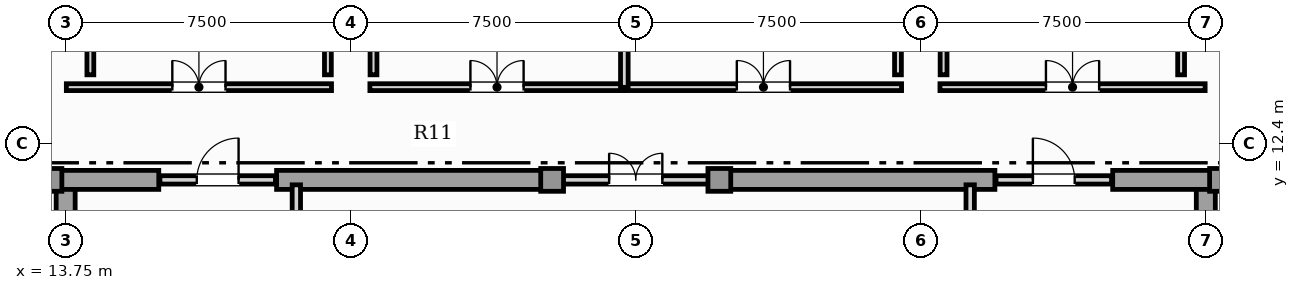
"""IFC4 building model, lengths in metres.
Left out: names, types, materials, properties, quantities, classifications, styles, units other than length and angle.
Written with IfcOpenShell. Run it as: python <this file> out.ifc"""

import sys

from ifc_helpers import new_model, si_unit, direction, frame, frame_2d, origin, origin_2d, place, context, subcontext, project, spatial, rectangle, hollow_rectangle, extrude, element, fill, save


model = new_model("IFC4")
c1 = context("Model", 3, precision=1e-05, world=origin(), true_north=direction((0.0, 1.0)))
c2 = subcontext(c1, "Body", "Model", "MODEL_VIEW")
j1 = project(units=[si_unit("LENGTHUNIT", "METRE"), si_unit("PLANEANGLEUNIT", "RADIAN")], contexts=[c1])
p1 = place(None, origin())
s1 = spatial("IfcSite", under=j1, at=p1, CompositionType="ELEMENT")
p2 = place(p1, origin())
s2 = spatial("IfcBuilding", under=s1, at=p2, CompositionType="ELEMENT")
p3 = place(p2, frame((0.0, 0.0, 377.45)))
s3 = spatial("IfcBuildingStorey", under=s2, at=p3, CompositionType="ELEMENT", Elevation=377.45)
for number, where, z_axis, x_axis in (
    (1, (13.75, 0.92, 0.0), (0.0, 0.0, 1.0), (0.0, 1.0, 0.0)),
    (2, (43.75, 0.92, 0.0), (0.0, 0.0, 1.0), (0.0, 1.0, 0.0)),
):
    element("IfcWall", number, at=place(p3, frame(where, z_axis=z_axis, x_axis=x_axis)), inside=s3, PredefinedType="SHEAR", context=c2, shape_type="SweptSolid", body=[
        extrude(rectangle(XDim=10.53, YDim=0.5, at=frame_2d((5.265, 0.0))), origin(), (0.0, 0.0, 1.0), 5.1),
    ])
p4 = place(p3, frame((13.25, 11.45, 0.0), z_axis=(0.0, 0.0, 1.0), x_axis=(1.0, 0.0, 0.0)))
e3 = element("IfcWall", 3, at=p4, inside=s3, PredefinedType="SHEAR", context=c2, shape_type="SweptSolid", body=[
    extrude(rectangle(XDim=2.95, YDim=0.5, at=frame_2d((1.475, 0.0))), origin(), (0.0, 0.0, 1.0), 5.1),
])
for number, where, z_axis, x_axis in (
    (4, (19.3, 11.45, 0.0), (0.0, 0.0, 1.0), (1.0, 0.0, 0.0)),
    (5, (30.9, 11.45, 0.0), (0.0, 0.0, 1.0), (1.0, 0.0, 0.0)),
):
    element("IfcWall", number, at=place(p3, frame(where, z_axis=z_axis, x_axis=x_axis)), inside=s3, PredefinedType="SHEAR", context=c2, shape_type="SweptSolid", body=[
        extrude(rectangle(XDim=7.3, YDim=0.5, at=frame_2d((3.65, 0.0))), origin(), (0.0, 0.0, 1.0), 5.1),
    ])
p5 = place(p3, frame((41.3, 11.45, 0.0), z_axis=(0.0, 0.0, 1.0), x_axis=(1.0, 0.0, 0.0)))
e6 = element("IfcWall", 6, at=p5, inside=s3, PredefinedType="SHEAR", context=c2, shape_type="SweptSolid", body=[
    extrude(rectangle(XDim=2.95, YDim=0.5, at=frame_2d((1.475, 0.0))), origin(), (0.0, 0.0, 1.0), 5.1),
])
for number, where, z_axis, x_axis in (
    (7, (13.35, 11.45, 0.0), (0.0, 0.0, 1.0), (1.0, 0.0, 0.0)),
    (8, (44.15, 11.45, 0.0), (0.0, 0.0, 1.0), (1.0, 0.0, 0.0)),
    (9, (26.55, 11.45, 0.0), (0.0, 0.0, 1.0), (1.0, 0.0, 0.0)),
    (10, (30.95, 11.45, 0.0), (0.0, 0.0, 1.0), (1.0, 0.0, 0.0)),
):
    element("IfcColumn", number, at=place(p3, frame(where, z_axis=z_axis, x_axis=x_axis)), inside=s3, PredefinedType="USERDEFINED", context=c2, shape_type="SweptSolid", body=[
        extrude(hollow_rectangle(XDim=0.6, YDim=0.6, WallThickness=0.04, at=origin_2d()), origin(), (0.0, 0.0, 1.0), 5.4),
    ])
p6 = place(p3, frame((19.82, 8.52, 0.0), z_axis=(0.0, 0.0, 1.0), x_axis=(0.0, 1.0, 0.0)))
e11 = element("IfcWall", 11, at=p6, inside=s3, PredefinedType="SOLIDWALL", context=c2, shape_type="SweptSolid", body=[
    extrude(rectangle(XDim=2.8, YDim=0.22, at=frame_2d((1.4, 0.0))), origin(), (0.0, 0.0, 1.0), 4.556),
])
p7 = place(p6, frame((0.85, 0.0, 0.0)))
e12 = element("IfcOpeningElement", 12, at=p7, cuts=e11, PredefinedType="OPENING", context=c2, shape_type="SweptSolid", body=[
    extrude(rectangle(XDim=1.1, YDim=2.2, at=frame_2d((0.55, 1.1))), frame((0.0, 0.12, 0.0), z_axis=(0.0, -1.0, 0.0), x_axis=(1.0, 0.0, 0.0)), (0.0, 0.0, 1.0), 0.24),
])
p8 = place(p3, frame((37.55, 8.52, 0.0), z_axis=(0.0, 0.0, 1.0), x_axis=(0.0, 1.0, 0.0)))
e13 = element("IfcWall", 13, at=p8, inside=s3, PredefinedType="SOLIDWALL", context=c2, shape_type="SweptSolid", body=[
    extrude(rectangle(XDim=2.8, YDim=0.22, at=frame_2d((1.4, 0.0))), origin(), (0.0, 0.0, 1.0), 4.556),
])
p9 = place(p8, frame((0.85, 0.0, 0.0)))
e14 = element("IfcOpeningElement", 14, at=p9, cuts=e13, PredefinedType="OPENING", context=c2, shape_type="SweptSolid", body=[
    extrude(rectangle(XDim=1.1, YDim=2.2, at=frame_2d((0.55, 1.1))), frame((0.0, 0.12, 0.0), z_axis=(0.0, -1.0, 0.0), x_axis=(1.0, 0.0, 0.0)), (0.0, 0.0, 1.0), 0.24),
])
p10 = place(p3, frame((16.23, 11.45, 0.0), z_axis=(0.0, 0.0, 1.0), x_axis=(1.0, 0.0, 0.0)))
e15 = element("IfcWall", 15, at=p10, inside=s3, PredefinedType="SOLIDWALL", context=c2, shape_type="SweptSolid", body=[
    extrude(rectangle(XDim=3.04, YDim=0.22, at=frame_2d((1.52, 0.0))), origin(), (0.0, 0.0, 1.0), 5.1),
])
p11 = place(p10, frame((0.97, 0.0, 0.0)))
e16 = element("IfcOpeningElement", 16, at=p11, cuts=e15, PredefinedType="OPENING", context=c2, shape_type="SweptSolid", body=[
    extrude(rectangle(XDim=1.1, YDim=2.2, at=frame_2d((0.55, 1.1))), frame((0.0, 0.12, 0.0), z_axis=(0.0, -1.0, 0.0), x_axis=(1.0, 0.0, 0.0)), (0.0, 0.0, 1.0), 0.24),
])
p12 = place(p3, frame((26.63, 11.45, 0.0), z_axis=(0.0, 0.0, 1.0), x_axis=(1.0, 0.0, 0.0)))
e17 = element("IfcWall", 17, at=p12, inside=s3, PredefinedType="SOLIDWALL", context=c2, shape_type="SweptSolid", body=[
    extrude(rectangle(XDim=4.24, YDim=0.22, at=frame_2d((2.12, 0.0))), origin(), (0.0, 0.0, 1.0), 5.1),
])
p13 = place(p12, frame((1.42, 0.0, 0.0)))
e18 = element("IfcOpeningElement", 18, at=p13, cuts=e17, PredefinedType="OPENING", context=c2, shape_type="SweptSolid", body=[
    extrude(rectangle(XDim=1.4, YDim=2.2, at=frame_2d((0.7, 1.1))), frame((0.0, 0.12, 0.0), z_axis=(0.0, -1.0, 0.0), x_axis=(1.0, 0.0, 0.0)), (0.0, 0.0, 1.0), 0.24),
])
p14 = place(p3, frame((38.23, 11.45, 0.0), z_axis=(0.0, 0.0, 1.0), x_axis=(1.0, 0.0, 0.0)))
e19 = element("IfcWall", 19, at=p14, inside=s3, PredefinedType="SOLIDWALL", context=c2, shape_type="SweptSolid", body=[
    extrude(rectangle(XDim=3.04, YDim=0.22, at=frame_2d((1.52, 0.0))), origin(), (0.0, 0.0, 1.0), 5.1),
])
p15 = place(p14, frame((0.97, 0.0, 0.0)))
e20 = element("IfcOpeningElement", 20, at=p15, cuts=e19, PredefinedType="OPENING", context=c2, shape_type="SweptSolid", body=[
    extrude(rectangle(XDim=1.1, YDim=2.2, at=frame_2d((0.55, 1.1))), frame((0.0, 0.12, 0.0), z_axis=(0.0, -1.0, 0.0), x_axis=(1.0, 0.0, 0.0)), (0.0, 0.0, 1.0), 0.24),
])
p16 = place(p3, frame((13.768, 13.89, 0.0), z_axis=(0.0, 0.0, 1.0), x_axis=(1.0, 0.0, 0.0)))
e21 = element("IfcWall", 21, at=p16, inside=s3, PredefinedType="PARTITIONING", context=c2, shape_type="SweptSolid", body=[
    extrude(rectangle(XDim=6.977, YDim=0.18, at=frame_2d((3.489, 0.0))), origin(), (0.0, 0.0, 1.0), 5.1),
])
p17 = place(p16, frame((2.789, 0.0, 0.0)))
e22 = element("IfcOpeningElement", 22, at=p17, cuts=e21, PredefinedType="OPENING", context=c2, shape_type="SweptSolid", body=[
    extrude(rectangle(XDim=1.4, YDim=2.2, at=frame_2d((0.7, 1.1))), frame((0.0, 0.1, 0.0), z_axis=(0.0, -1.0, 0.0), x_axis=(1.0, 0.0, 0.0)), (0.0, 0.0, 1.0), 0.2),
])
p18 = place(p3, frame((21.755, 13.89, 0.0), z_axis=(0.0, 0.0, 1.0), x_axis=(1.0, 0.0, 0.0)))
e23 = element("IfcWall", 23, at=p18, inside=s3, PredefinedType="PARTITIONING", context=c2, shape_type="SweptSolid", body=[
    extrude(rectangle(XDim=6.69, YDim=0.18, at=frame_2d((3.345, 0.0))), origin(), (0.0, 0.0, 1.0), 5.1),
])
p19 = place(p18, frame((2.645, 0.0, 0.0)))
e24 = element("IfcOpeningElement", 24, at=p19, cuts=e23, PredefinedType="OPENING", context=c2, shape_type="SweptSolid", body=[
    extrude(rectangle(XDim=1.4, YDim=2.2, at=frame_2d((0.7, 1.1))), frame((0.0, 0.1, 0.0), z_axis=(0.0, -1.0, 0.0), x_axis=(1.0, 0.0, 0.0)), (0.0, 0.0, 1.0), 0.2),
])
p20 = place(p3, frame((28.475, 13.89, 0.0), z_axis=(0.0, 0.0, 1.0), x_axis=(1.0, 0.0, 0.0)))
e25 = element("IfcWall", 25, at=p20, inside=s3, PredefinedType="PARTITIONING", context=c2, shape_type="SweptSolid", body=[
    extrude(rectangle(XDim=7.27, YDim=0.18, at=frame_2d((3.635, 0.0))), origin(), (0.0, 0.0, 1.0), 5.1),
])
p21 = place(p20, frame((2.935, 0.0, 0.0)))
e26 = element("IfcOpeningElement", 26, at=p21, cuts=e25, PredefinedType="OPENING", context=c2, shape_type="SweptSolid", body=[
    extrude(rectangle(XDim=1.4, YDim=2.2, at=frame_2d((0.7, 1.1))), frame((0.0, 0.1, 0.0), z_axis=(0.0, -1.0, 0.0), x_axis=(1.0, 0.0, 0.0)), (0.0, 0.0, 1.0), 0.2),
])
p22 = place(p3, frame((36.755, 13.89, 0.0), z_axis=(0.0, 0.0, 1.0), x_axis=(1.0, 0.0, 0.0)))
e27 = element("IfcWall", 27, at=p22, inside=s3, PredefinedType="PARTITIONING", context=c2, shape_type="SweptSolid", body=[
    extrude(rectangle(XDim=6.977, YDim=0.18, at=frame_2d((3.489, 0.0))), origin(), (0.0, 0.0, 1.0), 5.1),
])
p23 = place(p22, frame((2.789, 0.0, 0.0)))
e28 = element("IfcOpeningElement", 28, at=p23, cuts=e27, PredefinedType="OPENING", context=c2, shape_type="SweptSolid", body=[
    extrude(rectangle(XDim=1.4, YDim=2.2, at=frame_2d((0.7, 1.1))), frame((0.0, 0.1, 0.0), z_axis=(0.0, -1.0, 0.0), x_axis=(1.0, 0.0, 0.0)), (0.0, 0.0, 1.0), 0.2),
])
p24 = place(p3, frame((28.45, 13.885, 0.0), z_axis=(0.0, 0.0, 1.0), x_axis=(0.0, 1.0, 0.0)))
e29 = element("IfcWall", 29, at=p24, inside=s3, PredefinedType="PARTITIONING", context=c2, shape_type="SweptSolid", body=[
    extrude(rectangle(XDim=8.097, YDim=0.2, at=frame_2d((4.048, 0.0))), origin(), (0.0, 0.0, 1.0), 5.1),
])
p25 = place(p3, frame((20.65, 14.215, 0.0), z_axis=(0.0, 0.0, 1.0), x_axis=(0.0, 1.0, 0.0)))
e30 = element("IfcWall", 30, at=p25, inside=s3, PredefinedType="PARTITIONING", context=c2, shape_type="SweptSolid", body=[
    extrude(rectangle(XDim=7.767, YDim=0.18, at=frame_2d((3.883, 0.0))), origin(), (0.0, 0.0, 1.0), 5.1),
])
p26 = place(p3, frame((14.4, 21.991, 0.0), z_axis=(0.0, 0.0, 1.0), x_axis=(0.0, -1.0, 0.0)))
e31 = element("IfcWall", 31, at=p26, inside=s3, PredefinedType="PARTITIONING", context=c2, shape_type="SweptSolid", body=[
    extrude(rectangle(XDim=7.776, YDim=0.18, at=frame_2d((3.888, 0.0))), origin(), (0.0, 0.0, 1.0), 5.1),
])
for number, where, z_axis, x_axis in (
    (32, (21.85, 21.982, 0.0), (0.0, 0.0, 1.0), (0.0, -1.0, 0.0)),
    (33, (35.65, 14.215, 0.0), (0.0, 0.0, 1.0), (0.0, 1.0, 0.0)),
):
    element("IfcWall", number, at=place(p3, frame(where, z_axis=z_axis, x_axis=x_axis)), inside=s3, PredefinedType="PARTITIONING", context=c2, shape_type="SweptSolid", body=[
        extrude(rectangle(XDim=7.767, YDim=0.18, at=frame_2d((3.883, 0.0))), origin(), (0.0, 0.0, 1.0), 5.1),
    ])
for number, where, z_axis, x_axis in (
    (34, (43.1, 14.215, 0.0), (0.0, 0.0, 1.0), (0.0, 1.0, 0.0)),
    (35, (36.85, 18.295, 0.0), (0.0, 0.0, 1.0), (0.0, -1.0, 0.0)),
):
    element("IfcWall", number, at=place(p3, frame(where, z_axis=z_axis, x_axis=x_axis)), inside=s3, PredefinedType="PARTITIONING", context=c2, shape_type="SweptSolid", body=[
        extrude(rectangle(XDim=4.08, YDim=0.18, at=frame_2d((2.04, 0.0))), origin(), (0.0, 0.0, 1.0), 5.1),
    ])
p27 = place(p11, origin())
e36 = element("IfcDoor", 36, at=p27, inside=s3, OperationType="SINGLE_SWING_RIGHT", PredefinedType="DOOR", context=c2, shape_type="SweptSolid", body=[
    extrude(rectangle(XDim=1.1, YDim=2.2, at=frame_2d((0.55, 1.1))), frame((0.0, 0.025, 0.0), z_axis=(0.0, -1.0, 0.0), x_axis=(1.0, 0.0, 0.0)), (0.0, 0.0, 1.0), 0.05),
])
fill(e16, e36)
p28 = place(p13, origin())
e37 = element("IfcDoor", 37, at=p28, inside=s3, OperationType="DOUBLE_DOOR_SINGLE_SWING", PredefinedType="DOOR", context=c2, shape_type="SweptSolid", body=[
    extrude(rectangle(XDim=1.4, YDim=2.2, at=frame_2d((0.7, 1.1))), frame((0.0, 0.025, 0.0), z_axis=(0.0, -1.0, 0.0), x_axis=(1.0, 0.0, 0.0)), (0.0, 0.0, 1.0), 0.05),
])
fill(e18, e37)
p29 = place(p15, origin())
e38 = element("IfcDoor", 38, at=p29, inside=s3, OperationType="SINGLE_SWING_LEFT", PredefinedType="DOOR", context=c2, shape_type="SweptSolid", body=[
    extrude(rectangle(XDim=1.1, YDim=2.2, at=frame_2d((0.55, 1.1))), frame((0.0, 0.025, 0.0), z_axis=(0.0, -1.0, 0.0), x_axis=(1.0, 0.0, 0.0)), (0.0, 0.0, 1.0), 0.05),
])
fill(e20, e38)
p30 = place(p17, origin())
e39 = element("IfcDoor", 39, at=p30, inside=s3, OperationType="DOUBLE_DOOR_SINGLE_SWING", PredefinedType="DOOR", context=c2, shape_type="SweptSolid", body=[
    extrude(rectangle(XDim=1.4, YDim=2.2, at=frame_2d((0.7, 1.1))), frame((0.0, 0.025, 0.0), z_axis=(0.0, -1.0, 0.0), x_axis=(1.0, 0.0, 0.0)), (0.0, 0.0, 1.0), 0.05),
])
fill(e22, e39)
p31 = place(p19, origin())
e40 = element("IfcDoor", 40, at=p31, inside=s3, OperationType="DOUBLE_DOOR_SINGLE_SWING", PredefinedType="DOOR", context=c2, shape_type="SweptSolid", body=[
    extrude(rectangle(XDim=1.4, YDim=2.2, at=frame_2d((0.7, 1.1))), frame((0.0, 0.025, 0.0), z_axis=(0.0, -1.0, 0.0), x_axis=(1.0, 0.0, 0.0)), (0.0, 0.0, 1.0), 0.05),
])
fill(e24, e40)
p32 = place(p21, origin())
e41 = element("IfcDoor", 41, at=p32, inside=s3, OperationType="DOUBLE_DOOR_SINGLE_SWING", PredefinedType="DOOR", context=c2, shape_type="SweptSolid", body=[
    extrude(rectangle(XDim=1.4, YDim=2.2, at=frame_2d((0.7, 1.1))), frame((0.0, 0.025, 0.0), z_axis=(0.0, -1.0, 0.0), x_axis=(1.0, 0.0, 0.0)), (0.0, 0.0, 1.0), 0.05),
])
fill(e26, e41)
p33 = place(p23, origin())
e42 = element("IfcDoor", 42, at=p33, inside=s3, OperationType="DOUBLE_DOOR_SINGLE_SWING", PredefinedType="DOOR", context=c2, shape_type="SweptSolid", body=[
    extrude(rectangle(XDim=1.4, YDim=2.2, at=frame_2d((0.7, 1.1))), frame((0.0, 0.025, 0.0), z_axis=(0.0, -1.0, 0.0), x_axis=(1.0, 0.0, 0.0)), (0.0, 0.0, 1.0), 0.05),
])
fill(e28, e42)
save(model, sys.argv[1])
